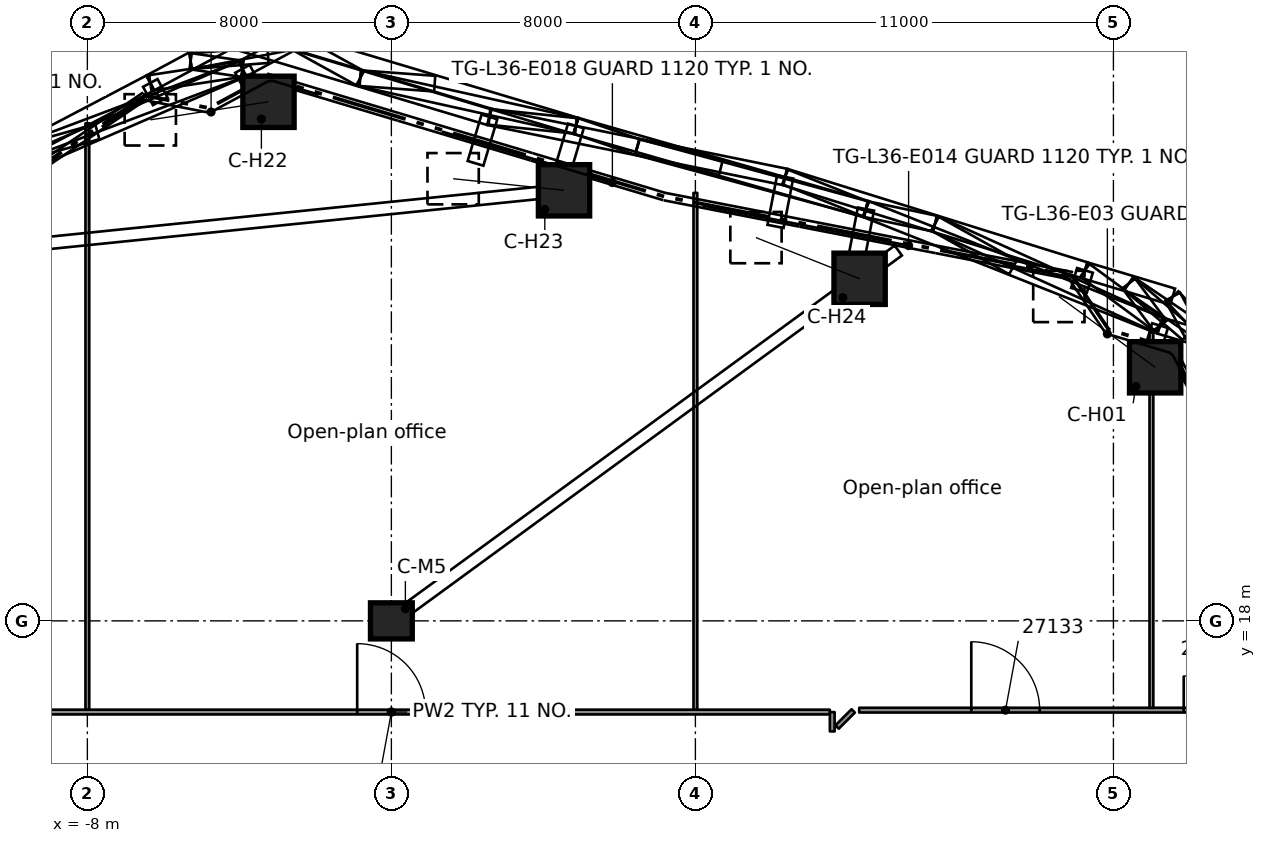
"""IFC4 building model, lengths in metres.
Left out: names, types, materials, properties, quantities, classifications, styles, units other than length and angle.
Written with IfcOpenShell. Run it as: python <this file> out.ifc"""

import sys

from ifc_helpers import new_model, si_unit, direction, frame, frame_2d, origin, origin_2d, place, context, subcontext, project, spatial, rectangle, extrude, element, fill, save


model = new_model("IFC4")
c1 = context("Model", 3, precision=1e-05, world=origin(), true_north=direction((0.0, 1.0)))
c2 = subcontext(c1, "Body", "Model", "MODEL_VIEW")
j1 = project(units=[si_unit("LENGTHUNIT", "METRE"), si_unit("PLANEANGLEUNIT", "RADIAN")], contexts=[c1])
p1 = place(None, origin())
s1 = spatial("IfcSite", under=j1, at=p1, CompositionType="ELEMENT")
p2 = place(p1, origin())
s2 = spatial("IfcBuilding", under=s1, at=p2, CompositionType="ELEMENT")
p3 = place(p2, frame((0.0, 0.0, 141.2)))
s3 = spatial("IfcBuildingStorey", under=s2, at=p3, CompositionType="ELEMENT", Elevation=141.2)
p4 = place(p3, frame((20.098, 24.672, 0.451), z_axis=(-0.538700406723, 0.396226891312, 0.743509329059), x_axis=(-0.592510461213, -0.805562755689, 0.0)))
e1 = element("IfcColumn", 1, at=p4, inside=s3, PredefinedType="COLUMN", context=c2, shape_type="SweptSolid", body=[
    extrude(rectangle(XDim=1.35, YDim=1.35, at=origin_2d()), origin(), (0.0, 0.0, 1.0), 4.704),
])
p5 = place(p3, frame((-3.234, 31.658, 0.451), z_axis=(-0.661134708716, -0.100942539324, 0.74344569451), x_axis=(0.150931663907, -0.988544198724, 0.0)))
e2 = element("IfcColumn", 2, at=p5, inside=s3, PredefinedType="COLUMN", context=c2, shape_type="SweptSolid", body=[
    extrude(rectangle(XDim=1.35, YDim=1.35, at=origin_2d()), origin(), (0.0, 0.0, 1.0), 4.704),
])
p6 = place(p3, frame((4.543, 29.329, 0.431), z_axis=(-0.634831676586, 0.066340760045, 0.769797145981), x_axis=(-0.10393536505, -0.994584053709, 0.0)))
e3 = element("IfcColumn", 3, at=p6, inside=s3, PredefinedType="COLUMN", context=c2, shape_type="SweptSolid", body=[
    extrude(rectangle(XDim=1.35, YDim=1.35, at=origin_2d()), origin(), (0.0, 0.0, 1.0), 4.596),
])
p7 = place(p3, frame((12.321, 27.001, 0.431), z_axis=(-0.593235257024, 0.23580703144, 0.769718762762), x_axis=(-0.369381674958, -0.929277772361, 0.0)))
e4 = element("IfcColumn", 4, at=p7, inside=s3, PredefinedType="COLUMN", context=c2, shape_type="SweptSolid", body=[
    extrude(rectangle(XDim=1.35, YDim=1.35, at=origin_2d()), origin(), (0.0, 0.0, 1.0), 4.597),
])
p8 = place(p3, frame((0.0, 18.0, 0.0), z_axis=(0.0, 0.0, 1.0), x_axis=(1.0, 0.0, 0.0)))
e5 = element("IfcColumn", 5, at=p8, inside=s3, PredefinedType="COLUMN", context=c2, shape_type="SweptSolid", body=[
    extrude(rectangle(XDim=1.1, YDim=0.95, at=origin_2d()), origin(), (0.0, 0.0, 1.0), 4.4),
])
p9 = place(p3, frame((-11.537, 15.601, 0.0), z_axis=(0.0, 0.0, 1.0), x_axis=(1.0, 0.0, 0.0)))
e6 = element("IfcWall", 6, at=p9, inside=s3, PredefinedType="PARTITIONING", context=c2, shape_type="SweptSolid", body=[
    extrude(rectangle(XDim=23.074, YDim=0.125, at=frame_2d((11.537, 0.0))), origin(), (0.0, 0.0, 1.0), 3.98),
])
p10 = place(p9, frame((10.637, 0.0, 0.0)))
e7 = element("IfcOpeningElement", 7, at=p10, cuts=e6, PredefinedType="OPENING", context=c2, shape_type="SweptSolid", body=[
    extrude(rectangle(XDim=1.8, YDim=2.1, at=frame_2d((0.9, 1.05))), frame((0.0, 0.073, 0.0), z_axis=(0.0, -1.0, 0.0), x_axis=(1.0, 0.0, 0.0)), (0.0, 0.0, 1.0), 0.145),
])
p11 = place(p3, frame((12.311, 15.651, 0.0), z_axis=(0.0, 0.0, 1.0), x_axis=(1.0, 0.0, 0.0)))
e8 = element("IfcWall", 8, at=p11, inside=s3, PredefinedType="PARTITIONING", context=c2, shape_type="SweptSolid", body=[
    extrude(rectangle(XDim=10.276, YDim=0.125, at=frame_2d((5.138, 0.0))), origin(), (0.0, 0.0, 1.0), 3.98),
])
p12 = place(p11, frame((8.539, 0.0, 0.0)))
e9 = element("IfcOpeningElement", 9, at=p12, cuts=e8, PredefinedType="OPENING", context=c2, shape_type="SweptSolid", body=[
    extrude(rectangle(XDim=0.9, YDim=2.1, at=frame_2d((0.45, 1.05))), frame((0.0, 0.073, 0.0), z_axis=(0.0, -1.0, 0.0), x_axis=(1.0, 0.0, 0.0)), (0.0, 0.0, 1.0), 0.145),
])
p13 = place(p11, frame((2.949, 0.0, 0.0)))
e10 = element("IfcOpeningElement", 10, at=p13, cuts=e8, PredefinedType="OPENING", context=c2, shape_type="SweptSolid", body=[
    extrude(rectangle(XDim=1.8, YDim=2.1, at=frame_2d((0.9, 1.05))), frame((0.0, 0.073, 0.0), z_axis=(0.0, -1.0, 0.0), x_axis=(1.0, 0.0, 0.0)), (0.0, 0.0, 1.0), 0.145),
])
p14 = place(p3, frame((11.729, 15.207, 0.0), z_axis=(0.0, 0.0, 1.0), x_axis=(0.707106781187, 0.707106781187, 0.0)))
e11 = element("IfcWall", 11, at=p14, inside=s3, PredefinedType="PARTITIONING", context=c2, shape_type="SweptSolid", body=[
    extrude(rectangle(XDim=0.6, YDim=0.125, at=frame_2d((0.3, 0.0))), origin(), (0.0, 0.0, 1.0), 3.98),
])
p15 = place(p3, frame((20.0, 15.713, 0.0), z_axis=(0.0, 0.0, 1.0), x_axis=(0.0, 1.0, 0.0)))
e12 = element("IfcWall", 12, at=p15, inside=s3, PredefinedType="PARTITIONING", context=c2, shape_type="SweptSolid", body=[
    extrude(rectangle(XDim=9.876, YDim=0.1, at=frame_2d((4.938, 0.0))), origin(), (0.0, 0.0, 1.0), 3.98),
])
p16 = place(p3, frame((11.601, 15.092, 0.0), z_axis=(0.0, 0.0, 1.0), x_axis=(0.0, 1.0, 0.0)))
e13 = element("IfcWall", 13, at=p16, inside=s3, PredefinedType="PARTITIONING", context=c2, shape_type="SweptSolid", body=[
    extrude(rectangle(XDim=0.508, YDim=0.125, at=frame_2d((0.254, 0.0))), origin(), (0.0, 0.0, 1.0), 3.98),
])
p17 = place(p3, frame((8.0, 15.664, 0.0), z_axis=(0.0, 0.0, 1.0), x_axis=(0.0, 1.0, 0.0)))
e14 = element("IfcWall", 14, at=p17, inside=s3, PredefinedType="PARTITIONING", context=c2, shape_type="SweptSolid", body=[
    extrude(rectangle(XDim=13.597, YDim=0.1, at=frame_2d((6.798, 0.0))), origin(), (0.0, 0.0, 1.0), 3.98),
])
p18 = place(p3, frame((-8.0, 15.664, 0.0), z_axis=(0.0, 0.0, 1.0), x_axis=(0.0, 1.0, 0.0)))
e15 = element("IfcWall", 15, at=p18, inside=s3, PredefinedType="PARTITIONING", context=c2, shape_type="SweptSolid", body=[
    extrude(rectangle(XDim=15.428, YDim=0.1, at=frame_2d((7.714, 0.0))), origin(), (0.0, 0.0, 1.0), 3.98),
])
p19 = place(p12, origin())
e16 = element("IfcDoor", 16, at=p19, inside=s3, OperationType="SINGLE_SWING_RIGHT", PredefinedType="DOOR", context=c2, shape_type="SweptSolid", body=[
    extrude(rectangle(XDim=0.9, YDim=2.1, at=frame_2d((0.45, 1.05))), frame((0.0, 0.025, 0.0), z_axis=(0.0, -1.0, 0.0), x_axis=(1.0, 0.0, 0.0)), (0.0, 0.0, 1.0), 0.05),
])
fill(e9, e16)
p20 = place(p13, origin())
e17 = element("IfcDoor", 17, at=p20, inside=s3, OperationType="DOUBLE_DOOR_SINGLE_SWING", PredefinedType="DOOR", context=c2, shape_type="SweptSolid", body=[
    extrude(rectangle(XDim=1.8, YDim=2.1, at=frame_2d((0.9, 1.05))), frame((0.0, 0.025, 0.0), z_axis=(0.0, -1.0, 0.0), x_axis=(1.0, 0.0, 0.0)), (0.0, 0.0, 1.0), 0.05),
])
fill(e10, e17)
p21 = place(p10, origin())
e18 = element("IfcDoor", 18, at=p21, inside=s3, OperationType="DOUBLE_DOOR_SINGLE_SWING", PredefinedType="DOOR", context=c2, shape_type="SweptSolid", body=[
    extrude(rectangle(XDim=1.8, YDim=2.1, at=frame_2d((0.9, 1.05))), frame((0.0, 0.025, 0.0), z_axis=(0.0, -1.0, 0.0), x_axis=(1.0, 0.0, 0.0)), (0.0, 0.0, 1.0), 0.05),
])
fill(e7, e18)
save(model, sys.argv[1])
